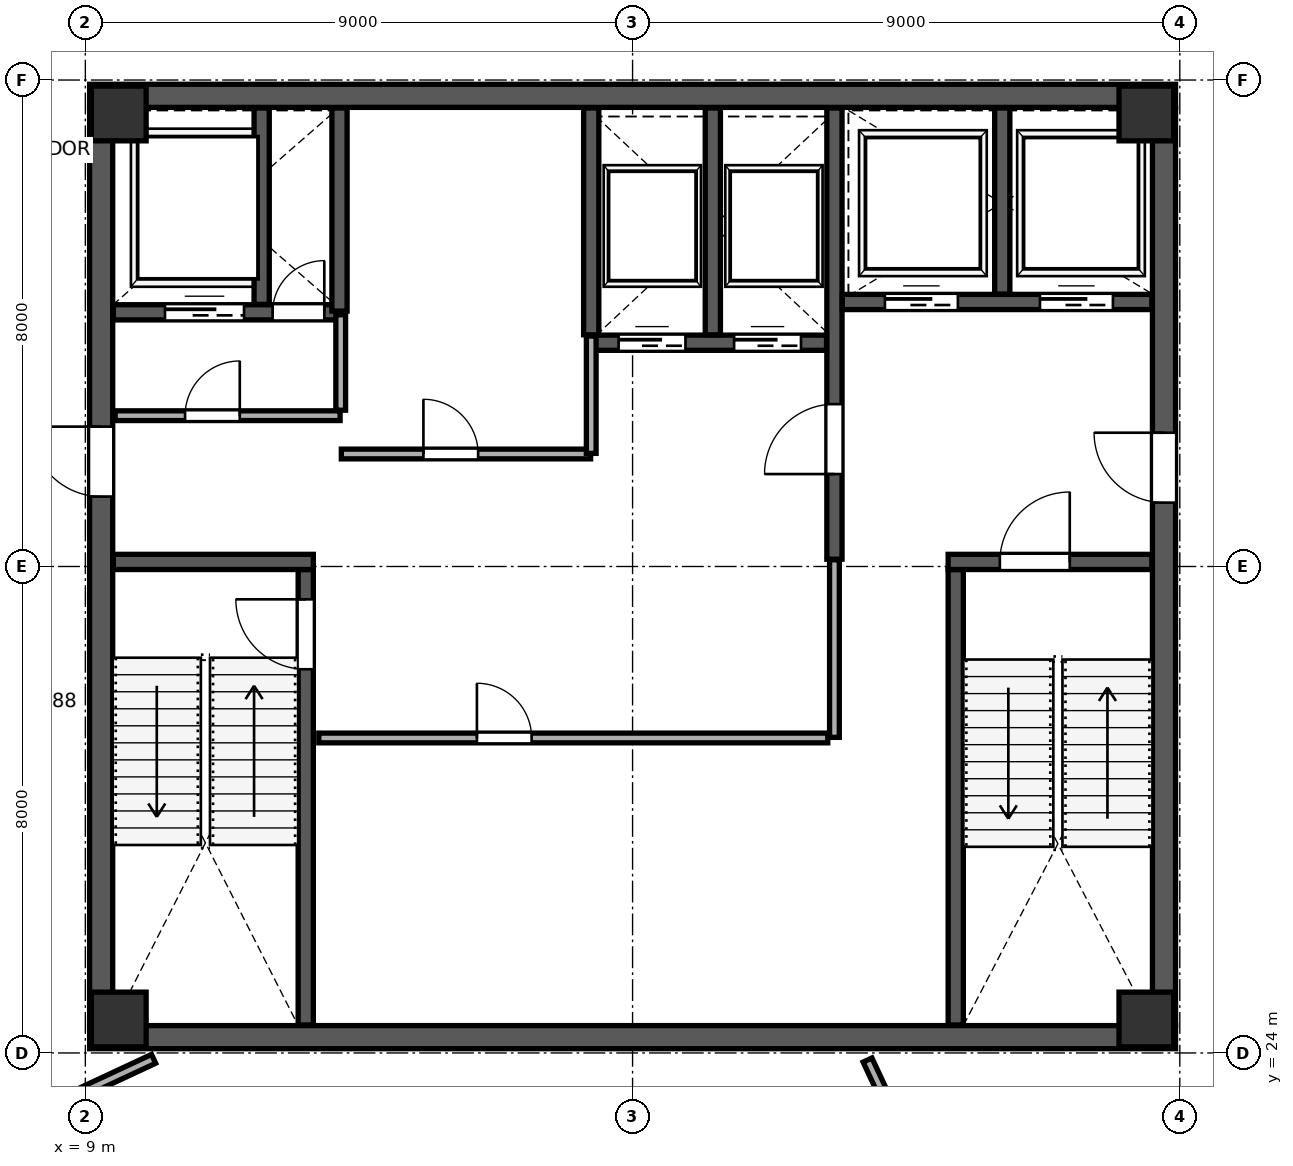
"""IFC4 building model, lengths in metres.
Left out: names, types, materials, properties, quantities, classifications, styles, units other than length and angle.
Written with IfcOpenShell. Run it as: python <this file> out.ifc"""

import sys

from ifc_helpers import new_model, si_unit, direction, frame, frame_2d, origin, origin_2d, place, context, subcontext, project, spatial, rectangle, extrude, source, transform, mapped, element, fill, save


model = new_model("IFC4")
c1 = context("Model", 3, precision=1e-05, world=origin(), true_north=direction((0.0, 1.0)))
c2 = subcontext(c1, "Body", "Model", "MODEL_VIEW")
j1 = project(units=[si_unit("LENGTHUNIT", "METRE"), si_unit("PLANEANGLEUNIT", "RADIAN")], contexts=[c1])
p1 = place(None, origin())
s1 = spatial("IfcSite", under=j1, at=p1, CompositionType="ELEMENT")
p2 = place(p1, origin())
s2 = spatial("IfcBuilding", under=s1, at=p2, CompositionType="ELEMENT")
p3 = place(p2, frame((0.0, 0.0, 340.8)))
s3 = spatial("IfcBuildingStorey", under=s2, at=p3, CompositionType="ELEMENT", Elevation=340.8)
m1 = source(origin(), c2, "Body", "SweptSolid", [
    extrude(rectangle(XDim=0.9, YDim=0.9, at=origin_2d()), origin(), (0.0, 0.0, 1.0), 4.198),
])
for number, where, z_axis, x_axis in (
    (1, (9.55, 24.55, 0.001), (0.0, 0.0, 1.0), (1.0, 0.0, 0.0)),
    (2, (26.45, 24.55, 0.001), (0.0, 0.0, 1.0), (1.0, 0.0, 0.0)),
    (3, (9.55, 39.45, 0.001), (0.0, 0.0, 1.0), (1.0, 0.0, 0.0)),
    (4, (26.45, 39.45, 0.001), (0.0, 0.0, 1.0), (1.0, 0.0, 0.0)),
):
    element("IfcColumn", number, at=place(p3, frame(where, z_axis=z_axis, x_axis=x_axis)), inside=s3, PredefinedType="COLUMN", context=c2, shape_type="MappedRepresentation", body=[
        mapped(m1, transform((0.0, 0.0, 0.0), scale=1.0)),
    ])
p4 = place(p3, frame((9.26, 24.45, 0.0), z_axis=(0.0, 0.0, 1.0), x_axis=(0.0, 1.0, 0.0)))
e5 = element("IfcWall", 5, at=p4, inside=s3, PredefinedType="SHEAR", context=c2, shape_type="SweptSolid", body=[
    extrude(rectangle(XDim=15.1, YDim=0.38, at=frame_2d((7.55, 0.0))), origin(), (0.0, 0.0, 1.0), 3.96),
])
p5 = place(p4, frame((8.7, 0.0, 0.0)))
e6 = element("IfcOpeningElement", 6, at=p5, cuts=e5, PredefinedType="OPENING", context=c2, shape_type="SweptSolid", body=[
    extrude(rectangle(XDim=1.15, YDim=2.2, at=frame_2d((0.575, 1.1))), frame((0.0, 0.2, 0.0), z_axis=(0.0, -1.0, 0.0), x_axis=(1.0, 0.0, 0.0)), (0.0, 0.0, 1.0), 0.4),
])
p6 = place(p3, frame((26.74, 24.45, 0.0), z_axis=(0.0, 0.0, 1.0), x_axis=(0.0, 1.0, 0.0)))
e7 = element("IfcWall", 7, at=p6, inside=s3, PredefinedType="SHEAR", context=c2, shape_type="SweptSolid", body=[
    extrude(rectangle(XDim=15.1, YDim=0.38, at=frame_2d((7.55, 0.0))), origin(), (0.0, 0.0, 1.0), 3.96),
])
p7 = place(p6, frame((8.6, 0.0, 0.0)))
e8 = element("IfcOpeningElement", 8, at=p7, cuts=e7, PredefinedType="OPENING", context=c2, shape_type="SweptSolid", body=[
    extrude(rectangle(XDim=1.15, YDim=2.2, at=frame_2d((0.575, 1.1))), frame((0.0, 0.2, 0.0), z_axis=(0.0, -1.0, 0.0), x_axis=(1.0, 0.0, 0.0)), (0.0, 0.0, 1.0), 0.4),
])
for number, where, z_axis, x_axis in (
    (9, (9.07, 24.26, 0.0), (0.0, 0.0, 1.0), (1.0, 0.0, 0.0)),
    (10, (9.07, 39.74, 0.0), (0.0, 0.0, 1.0), (1.0, 0.0, 0.0)),
):
    element("IfcWall", number, at=place(p3, frame(where, z_axis=z_axis, x_axis=x_axis)), inside=s3, PredefinedType="SHEAR", context=c2, shape_type="SweptSolid", body=[
        extrude(rectangle(XDim=17.86, YDim=0.38, at=frame_2d((8.93, 0.0))), origin(), (0.0, 0.0, 1.0), 3.96),
    ])
p8 = place(p3, frame((12.625, 24.46, 0.0), z_axis=(0.0, 0.0, 1.0), x_axis=(0.0, 1.0, 0.0)))
e11 = element("IfcWall", 11, at=p8, inside=s3, PredefinedType="SHEAR", context=c2, shape_type="SweptSolid", body=[
    extrude(rectangle(XDim=7.49, YDim=0.25, at=frame_2d((3.745, 0.0))), origin(), (0.0, 0.0, 1.0), 3.96),
])
p9 = place(p8, frame((5.85, 0.0, 0.0)))
e12 = element("IfcOpeningElement", 12, at=p9, cuts=e11, PredefinedType="OPENING", context=c2, shape_type="SweptSolid", body=[
    extrude(rectangle(XDim=1.15, YDim=2.2, at=frame_2d((0.575, 1.1))), frame((0.0, 0.135, 0.0), z_axis=(0.0, -1.0, 0.0), x_axis=(1.0, 0.0, 0.0)), (0.0, 0.0, 1.0), 0.27),
])
p10 = place(p3, frame((9.46, 32.075, 0.0), z_axis=(0.0, 0.0, 1.0), x_axis=(1.0, 0.0, 0.0)))
e13 = element("IfcWall", 13, at=p10, inside=s3, PredefinedType="SHEAR", context=c2, shape_type="SweptSolid", body=[
    extrude(rectangle(XDim=3.29, YDim=0.25, at=frame_2d((1.645, 0.0))), origin(), (0.0, 0.0, 1.0), 3.96),
])
p11 = place(p3, frame((23.315, 24.46, 0.0), z_axis=(0.0, 0.0, 1.0), x_axis=(0.0, 1.0, 0.0)))
e14 = element("IfcWall", 14, at=p11, inside=s3, PredefinedType="SHEAR", context=c2, shape_type="SweptSolid", body=[
    extrude(rectangle(XDim=7.49, YDim=0.25, at=frame_2d((3.745, 0.0))), origin(), (0.0, 0.0, 1.0), 3.96),
])
p12 = place(p3, frame((23.19, 32.075, 0.0), z_axis=(0.0, 0.0, 1.0), x_axis=(1.0, 0.0, 0.0)))
e15 = element("IfcWall", 15, at=p12, inside=s3, PredefinedType="SHEAR", context=c2, shape_type="SweptSolid", body=[
    extrude(rectangle(XDim=3.35, YDim=0.25, at=frame_2d((1.675, 0.0))), origin(), (0.0, 0.0, 1.0), 3.96),
])
p13 = place(p12, frame((0.85, 0.0, 0.0)))
e16 = element("IfcOpeningElement", 16, at=p13, cuts=e15, PredefinedType="OPENING", context=c2, shape_type="SweptSolid", body=[
    extrude(rectangle(XDim=1.15, YDim=2.2, at=frame_2d((0.575, 1.1))), frame((0.0, 0.135, 0.0), z_axis=(0.0, -1.0, 0.0), x_axis=(1.0, 0.0, 0.0)), (0.0, 0.0, 1.0), 0.27),
])
p14 = place(p3, frame((21.32, 32.12, 0.0), z_axis=(0.0, 0.0, 1.0), x_axis=(0.0, 1.0, 0.0)))
e17 = element("IfcWall", 17, at=p14, inside=s3, PredefinedType="SHEAR", context=c2, shape_type="SweptSolid", body=[
    extrude(rectangle(XDim=7.42, YDim=0.25, at=frame_2d((3.71, 0.0))), origin(), (0.0, 0.0, 1.0), 3.96),
])
p15 = place(p14, frame((1.4, 0.0, 0.0)))
e18 = element("IfcOpeningElement", 18, at=p15, cuts=e17, PredefinedType="OPENING", context=c2, shape_type="SweptSolid", body=[
    extrude(rectangle(XDim=1.15, YDim=2.2, at=frame_2d((0.575, 1.1))), frame((0.0, 0.135, 0.0), z_axis=(0.0, -1.0, 0.0), x_axis=(1.0, 0.0, 0.0)), (0.0, 0.0, 1.0), 0.27),
])
p16 = place(p3, frame((9.46, 36.18, 0.0), z_axis=(0.0, 0.0, 1.0), x_axis=(1.0, 0.0, 0.0)))
e19 = element("IfcWall", 19, at=p16, inside=s3, PredefinedType="SHEAR", context=c2, shape_type="SweptSolid", body=[
    extrude(rectangle(XDim=3.79, YDim=0.25, at=frame_2d((1.895, 0.0))), origin(), (0.0, 0.0, 1.0), 3.96),
])
p17 = place(p16, frame((2.62, 0.0, 0.0)))
e20 = element("IfcOpeningElement", 20, at=p17, cuts=e19, PredefinedType="OPENING", context=c2, shape_type="SweptSolid", body=[
    extrude(rectangle(XDim=0.85, YDim=2.1, at=frame_2d((0.425, 1.05))), frame((0.0, 0.135, 0.0), z_axis=(0.0, -1.0, 0.0), x_axis=(1.0, 0.0, 0.0)), (0.0, 0.0, 1.0), 0.27),
])
p18 = place(p16, frame((0.85, 0.0, 0.0)))
e21 = element("IfcOpeningElement", 21, at=p18, cuts=e19, PredefinedType="OPENING", context=c2, shape_type="SweptSolid", body=[
    extrude(rectangle(XDim=1.3, YDim=2.25, at=frame_2d((0.65, 1.125))), frame((0.0, 0.135, 0.0), z_axis=(0.0, -1.0, 0.0), x_axis=(1.0, 0.0, 0.0)), (0.0, 0.0, 1.0), 0.27),
])
p19 = place(p3, frame((11.9, 36.31, 0.0), z_axis=(0.0, 0.0, 1.0), x_axis=(0.0, 1.0, 0.0)))
e22 = element("IfcWall", 22, at=p19, inside=s3, PredefinedType="SHEAR", context=c2, shape_type="SweptSolid", body=[
    extrude(rectangle(XDim=3.23, YDim=0.25, at=frame_2d((1.615, 0.0))), origin(), (0.0, 0.0, 1.0), 3.96),
])
p20 = place(p3, frame((21.45, 36.35, 0.0), z_axis=(0.0, 0.0, 1.0), x_axis=(1.0, 0.0, 0.0)))
e23 = element("IfcWall", 23, at=p20, inside=s3, PredefinedType="SHEAR", context=c2, shape_type="SweptSolid", body=[
    extrude(rectangle(XDim=5.09, YDim=0.25, at=frame_2d((2.545, 0.0))), origin(), (0.0, 0.0, 1.0), 3.96),
])
p21 = place(p20, frame((0.7, 0.0, 0.0)))
e24 = element("IfcOpeningElement", 24, at=p21, cuts=e23, PredefinedType="OPENING", context=c2, shape_type="SweptSolid", body=[
    extrude(rectangle(XDim=1.2, YDim=2.2, at=frame_2d((0.6, 1.1))), frame((0.0, 0.135, 0.0), z_axis=(0.0, -1.0, 0.0), x_axis=(1.0, 0.0, 0.0)), (0.0, 0.0, 1.0), 0.27),
])
p22 = place(p20, frame((3.25, 0.0, 0.0)))
e25 = element("IfcOpeningElement", 25, at=p22, cuts=e23, PredefinedType="OPENING", context=c2, shape_type="SweptSolid", body=[
    extrude(rectangle(XDim=1.2, YDim=2.2, at=frame_2d((0.6, 1.1))), frame((0.0, 0.135, 0.0), z_axis=(0.0, -1.0, 0.0), x_axis=(1.0, 0.0, 0.0)), (0.0, 0.0, 1.0), 0.27),
])
p23 = place(p3, frame((24.08, 36.48, 0.0), z_axis=(0.0, 0.0, 1.0), x_axis=(0.0, 1.0, 0.0)))
e26 = element("IfcWall", 26, at=p23, inside=s3, PredefinedType="SHEAR", context=c2, shape_type="SweptSolid", body=[
    extrude(rectangle(XDim=3.06, YDim=0.25, at=frame_2d((1.53, 0.0))), origin(), (0.0, 0.0, 1.0), 3.96),
])
p24 = place(p3, frame((13.18, 36.2, 0.0), z_axis=(0.0, 0.0, 1.0), x_axis=(0.0, 1.0, 0.0)))
e27 = element("IfcWall", 27, at=p24, inside=s3, PredefinedType="SHEAR", context=c2, shape_type="SweptSolid", body=[
    extrude(rectangle(XDim=3.34, YDim=0.25, at=frame_2d((1.67, 0.0))), origin(), (0.0, 0.0, 1.0), 3.96),
])
p25 = place(p3, frame((17.32, 35.68, 0.0), z_axis=(0.0, 0.0, 1.0), x_axis=(1.0, 0.0, 0.0)))
e28 = element("IfcWall", 28, at=p25, inside=s3, PredefinedType="SHEAR", context=c2, shape_type="SweptSolid", body=[
    extrude(rectangle(XDim=3.87, YDim=0.25, at=frame_2d((1.935, 0.0))), origin(), (0.0, 0.0, 1.0), 3.96),
])
p26 = place(p25, frame((0.45, 0.0, 0.0)))
e29 = element("IfcOpeningElement", 29, at=p26, cuts=e28, PredefinedType="OPENING", context=c2, shape_type="SweptSolid", body=[
    extrude(rectangle(XDim=1.1, YDim=2.2, at=frame_2d((0.55, 1.1))), frame((0.0, 0.135, 0.0), z_axis=(0.0, -1.0, 0.0), x_axis=(1.0, 0.0, 0.0)), (0.0, 0.0, 1.0), 0.27),
])
p27 = place(p25, frame((2.35, 0.0, 0.0)))
e30 = element("IfcOpeningElement", 30, at=p27, cuts=e28, PredefinedType="OPENING", context=c2, shape_type="SweptSolid", body=[
    extrude(rectangle(XDim=1.1, YDim=2.2, at=frame_2d((0.55, 1.1))), frame((0.0, 0.135, 0.0), z_axis=(0.0, -1.0, 0.0), x_axis=(1.0, 0.0, 0.0)), (0.0, 0.0, 1.0), 0.27),
])
for number, where, z_axis, x_axis in (
    (31, (17.32, 35.81, 0.0), (0.0, 0.0, 1.0), (0.0, 1.0, 0.0)),
    (32, (19.32, 35.81, 0.0), (0.0, 0.0, 1.0), (0.0, 1.0, 0.0)),
):
    element("IfcWall", number, at=place(p3, frame(where, z_axis=z_axis, x_axis=x_axis)), inside=s3, PredefinedType="SHEAR", context=c2, shape_type="SweptSolid", body=[
        extrude(rectangle(XDim=3.73, YDim=0.25, at=frame_2d((1.865, 0.0))), origin(), (0.0, 0.0, 1.0), 3.96),
    ])
p28 = place(p3, frame((9.49, 34.48, 0.0), z_axis=(0.0, 0.0, 1.0), x_axis=(1.0, 0.0, 0.0)))
e33 = element("IfcWall", 33, at=p28, inside=s3, PredefinedType="PARTITIONING", context=c2, shape_type="SweptSolid", body=[
    extrude(rectangle(XDim=3.7, YDim=0.16, at=frame_2d((1.85, 0.0))), origin(), (0.0, 0.0, 1.0), 3.96),
])
p29 = place(p28, frame((1.15, 0.0, 0.0)))
e34 = element("IfcOpeningElement", 34, at=p29, cuts=e33, PredefinedType="OPENING", context=c2, shape_type="SweptSolid", body=[
    extrude(rectangle(XDim=0.9, YDim=2.15, at=frame_2d((0.45, 1.075))), frame((0.0, 0.09, 0.0), z_axis=(0.0, -1.0, 0.0), x_axis=(1.0, 0.0, 0.0)), (0.0, 0.0, 1.0), 0.18),
])
p30 = place(p3, frame((13.2, 34.57, 0.0), z_axis=(0.0, 0.0, 1.0), x_axis=(0.0, 1.0, 0.0)))
e35 = element("IfcWall", 35, at=p30, inside=s3, PredefinedType="PARTITIONING", context=c2, shape_type="SweptSolid", body=[
    extrude(rectangle(XDim=1.57, YDim=0.16, at=frame_2d((0.785, 0.0))), origin(), (0.0, 0.0, 1.0), 3.96),
])
p31 = place(p3, frame((13.21, 33.85, 0.0), z_axis=(0.0, 0.0, 1.0), x_axis=(1.0, 0.0, 0.0)))
e36 = element("IfcWall", 36, at=p31, inside=s3, PredefinedType="PARTITIONING", context=c2, shape_type="SweptSolid", body=[
    extrude(rectangle(XDim=4.1, YDim=0.16, at=frame_2d((2.05, 0.0))), origin(), (0.0, 0.0, 1.0), 3.96),
])
p32 = place(p31, frame((1.35, 0.0, 0.0)))
e37 = element("IfcOpeningElement", 37, at=p32, cuts=e36, PredefinedType="OPENING", context=c2, shape_type="SweptSolid", body=[
    extrude(rectangle(XDim=0.9, YDim=2.15, at=frame_2d((0.45, 1.075))), frame((0.0, 0.09, 0.0), z_axis=(0.0, -1.0, 0.0), x_axis=(1.0, 0.0, 0.0)), (0.0, 0.0, 1.0), 0.18),
])
p33 = place(p3, frame((17.32, 33.86, 0.0), z_axis=(0.0, 0.0, 1.0), x_axis=(0.0, 1.0, 0.0)))
e38 = element("IfcWall", 38, at=p33, inside=s3, PredefinedType="PARTITIONING", context=c2, shape_type="SweptSolid", body=[
    extrude(rectangle(XDim=1.93, YDim=0.16, at=frame_2d((0.965, 0.0))), origin(), (0.0, 0.0, 1.0), 3.96),
])
p34 = place(p3, frame((12.84, 29.18, 0.0), z_axis=(0.0, 0.0, 1.0), x_axis=(1.0, 0.0, 0.0)))
e39 = element("IfcWall", 39, at=p34, inside=s3, PredefinedType="PARTITIONING", context=c2, shape_type="SweptSolid", body=[
    extrude(rectangle(XDim=8.37, YDim=0.16, at=frame_2d((4.185, 0.0))), origin(), (0.0, 0.0, 1.0), 3.96),
])
p35 = place(p34, frame((2.6, 0.0, 0.0)))
e40 = element("IfcOpeningElement", 40, at=p35, cuts=e39, PredefinedType="OPENING", context=c2, shape_type="SweptSolid", body=[
    extrude(rectangle(XDim=0.9, YDim=2.15, at=frame_2d((0.45, 1.075))), frame((0.0, 0.09, 0.0), z_axis=(0.0, -1.0, 0.0), x_axis=(1.0, 0.0, 0.0)), (0.0, 0.0, 1.0), 0.18),
])
p36 = place(p3, frame((21.32, 29.19, 0.0), z_axis=(0.0, 0.0, 1.0), x_axis=(0.0, 1.0, 0.0)))
e41 = element("IfcWall", 41, at=p36, inside=s3, PredefinedType="PARTITIONING", context=c2, shape_type="SweptSolid", body=[
    extrude(rectangle(XDim=2.92, YDim=0.16, at=frame_2d((1.46, 0.0))), origin(), (0.0, 0.0, 1.0), 3.96),
])
p37 = place(p3, frame((8.268, 23.038, 0.0), z_axis=(0.0, 0.0, 1.0), x_axis=(0.906308042279, 0.422617714371, 0.0)))
e42 = element("IfcWall", 42, at=p37, inside=s3, PredefinedType="PARTITIONING", context=c2, shape_type="SweptSolid", body=[
    extrude(rectangle(XDim=2.047, YDim=0.16, at=frame_2d((1.023, 0.0))), origin(), (0.0, 0.0, 1.0), 3.96),
])
p38 = place(p3, frame((21.864, 23.884, 0.0), z_axis=(0.0, 0.0, 1.0), x_axis=(0.42259522887, -0.906318527085, 0.0)))
e43 = element("IfcWall", 43, at=p38, inside=s3, PredefinedType="PARTITIONING", context=c2, shape_type="SweptSolid", body=[
    extrude(rectangle(XDim=3.73, YDim=0.16, at=frame_2d((1.865, 0.0))), origin(), (0.0, 0.0, 1.0), 3.96),
])
p39 = place(p3, frame((24.775, 49.537, 0.0), z_axis=(0.0, 0.0, 1.0), x_axis=(0.422615543458, -0.906309054588, 0.0)))
e44 = element("IfcWall", 44, at=p39, inside=s3, PredefinedType="PARTITIONING", context=c2, shape_type="SweptSolid", body=[
    extrude(rectangle(XDim=25.75, YDim=0.1, at=frame_2d((12.875, 0.0))), origin(), (0.0, 0.0, 1.0), 3.96),
])
p40 = place(p39, frame((4.3, 0.0, 0.0)))
e45 = element("IfcOpeningElement", 45, at=p40, cuts=e44, PredefinedType="OPENING", context=c2, shape_type="SweptSolid", body=[
    extrude(rectangle(XDim=0.95, YDim=2.15, at=frame_2d((0.475, 1.075))), frame((0.0, 0.06, 0.0), z_axis=(0.0, -1.0, 0.0), x_axis=(1.0, 0.0, 0.0)), (0.0, 0.0, 1.0), 0.12),
])
p41 = place(p3, frame((2.62, 38.698, 0.0), z_axis=(0.0, 0.0, 1.0), x_axis=(0.90630352598, 0.422627399487, 0.0)))
e46 = element("IfcWall", 46, at=p41, inside=s3, PredefinedType="PARTITIONING", context=c2, shape_type="SweptSolid", body=[
    extrude(rectangle(XDim=17.04, YDim=0.1, at=frame_2d((8.52, 0.0))), origin(), (0.0, 0.0, 1.0), 3.96),
])
p42 = place(p3, frame((24.89, 21.135, 0.0), z_axis=(0.0, 0.0, 1.0), x_axis=(0.906308982529, 0.42261569799, 0.0)))
e47 = element("IfcWall", 47, at=p42, inside=s3, PredefinedType="PARTITIONING", context=c2, shape_type="SweptSolid", body=[
    extrude(rectangle(XDim=17.54, YDim=0.16, at=frame_2d((8.77, 0.0))), origin(), (0.0, 0.0, 1.0), 3.96),
])
m2 = source(origin(), c2, "Body", "SweptSolid", [
    extrude(rectangle(XDim=1.15, YDim=2.2, at=frame_2d((0.575, 1.1))), frame((0.0, 0.025, 0.0), z_axis=(0.0, -1.0, 0.0), x_axis=(1.0, 0.0, 0.0)), (0.0, 0.0, 1.0), 0.05),
])
p43 = place(p9, origin())
e48 = element("IfcDoor", 48, at=p43, inside=s3, OperationType="SINGLE_SWING_RIGHT", PredefinedType="DOOR", context=c2, shape_type="MappedRepresentation", body=[
    mapped(m2, transform((0.0, 0.0, 0.0), scale=1.0)),
])
fill(e12, e48)
m3 = source(origin(), c2, "Body", "SweptSolid", [
    extrude(rectangle(XDim=1.15, YDim=2.2, at=frame_2d((0.575, 1.1))), frame((0.0, 0.025, 0.0), z_axis=(0.0, -1.0, 0.0), x_axis=(1.0, 0.0, 0.0)), (0.0, 0.0, 1.0), 0.05),
])
p44 = place(p15, origin())
e49 = element("IfcDoor", 49, at=p44, inside=s3, OperationType="SINGLE_SWING_LEFT", PredefinedType="DOOR", context=c2, shape_type="MappedRepresentation", body=[
    mapped(m3, transform((0.0, 0.0, 0.0), scale=1.0)),
])
fill(e18, e49)
p45 = place(p13, origin())
e50 = element("IfcDoor", 50, at=p45, inside=s3, OperationType="SINGLE_SWING_RIGHT", PredefinedType="DOOR", context=c2, shape_type="MappedRepresentation", body=[
    mapped(m2, transform((0.0, 0.0, 0.0), scale=1.0)),
])
fill(e16, e50)
p46 = place(p7, origin())
e51 = element("IfcDoor", 51, at=p46, inside=s3, OperationType="SINGLE_SWING_RIGHT", PredefinedType="DOOR", context=c2, shape_type="MappedRepresentation", body=[
    mapped(m3, transform((0.0, 0.0, 0.0), scale=1.0)),
])
fill(e8, e51)
p47 = place(p5, origin())
e52 = element("IfcDoor", 52, at=p47, inside=s3, OperationType="SINGLE_SWING_RIGHT", PredefinedType="DOOR", context=c2, shape_type="MappedRepresentation", body=[
    mapped(m3, transform((0.0, 0.0, 0.0), scale=1.0)),
])
fill(e6, e52)
m4 = source(origin(), c2, "Body", "SweptSolid", [
    extrude(rectangle(XDim=0.85, YDim=2.1, at=frame_2d((0.425, 1.05))), frame((0.0, 0.025, 0.0), z_axis=(0.0, -1.0, 0.0), x_axis=(1.0, 0.0, 0.0)), (0.0, 0.0, 1.0), 0.05),
])
p48 = place(p17, origin())
e53 = element("IfcDoor", 53, at=p48, inside=s3, OperationType="SINGLE_SWING_RIGHT", PredefinedType="DOOR", context=c2, shape_type="MappedRepresentation", body=[
    mapped(m4, transform((0.0, 0.0, 0.0), scale=1.0)),
])
fill(e20, e53)
m5 = source(origin(), c2, "Body", "SweptSolid", [
    extrude(rectangle(XDim=1.1, YDim=2.2, at=frame_2d((0.55, 1.1))), frame((0.0, 0.025, 0.0), z_axis=(0.0, -1.0, 0.0), x_axis=(1.0, 0.0, 0.0)), (0.0, 0.0, 1.0), 0.05),
])
p49 = place(p26, origin())
e54 = element("IfcDoor", 54, at=p49, inside=s3, OperationType="SLIDING_TO_LEFT", PredefinedType="DOOR", context=c2, shape_type="MappedRepresentation", body=[
    mapped(m5, transform((0.0, 0.0, 0.0), scale=1.0)),
])
fill(e29, e54)
p50 = place(p27, origin())
e55 = element("IfcDoor", 55, at=p50, inside=s3, OperationType="SLIDING_TO_RIGHT", PredefinedType="DOOR", context=c2, shape_type="MappedRepresentation", body=[
    mapped(m5, transform((0.0, 0.0, 0.0), scale=1.0)),
])
fill(e30, e55)
m6 = source(origin(), c2, "Body", "SweptSolid", [
    extrude(rectangle(XDim=1.2, YDim=2.2, at=frame_2d((0.6, 1.1))), frame((0.0, 0.025, 0.0), z_axis=(0.0, -1.0, 0.0), x_axis=(1.0, 0.0, 0.0)), (0.0, 0.0, 1.0), 0.05),
])
p51 = place(p21, origin())
e56 = element("IfcDoor", 56, at=p51, inside=s3, OperationType="SLIDING_TO_LEFT", PredefinedType="DOOR", context=c2, shape_type="MappedRepresentation", body=[
    mapped(m6, transform((0.0, 0.0, 0.0), scale=1.0)),
])
fill(e24, e56)
p52 = place(p22, origin())
e57 = element("IfcDoor", 57, at=p52, inside=s3, OperationType="SLIDING_TO_RIGHT", PredefinedType="DOOR", context=c2, shape_type="MappedRepresentation", body=[
    mapped(m6, transform((0.0, 0.0, 0.0), scale=1.0)),
])
fill(e25, e57)
m7 = source(origin(), c2, "Body", "SweptSolid", [
    extrude(rectangle(XDim=1.3, YDim=2.25, at=frame_2d((0.65, 1.125))), frame((0.0, 0.025, 0.0), z_axis=(0.0, -1.0, 0.0), x_axis=(1.0, 0.0, 0.0)), (0.0, 0.0, 1.0), 0.05),
])
p53 = place(p18, origin())
e58 = element("IfcDoor", 58, at=p53, inside=s3, OperationType="SLIDING_TO_LEFT", PredefinedType="DOOR", context=c2, shape_type="MappedRepresentation", body=[
    mapped(m7, transform((0.0, 0.0, 0.0), scale=1.0)),
])
fill(e21, e58)
m8 = source(origin(), c2, "Body", "SweptSolid", [
    extrude(rectangle(XDim=0.9, YDim=2.15, at=frame_2d((0.45, 1.075))), frame((0.0, 0.025, 0.0), z_axis=(0.0, -1.0, 0.0), x_axis=(1.0, 0.0, 0.0)), (0.0, 0.0, 1.0), 0.05),
])
p54 = place(p29, origin())
e59 = element("IfcDoor", 59, at=p54, inside=s3, OperationType="SINGLE_SWING_RIGHT", PredefinedType="DOOR", context=c2, shape_type="MappedRepresentation", body=[
    mapped(m8, transform((0.0, 0.0, 0.0), scale=1.0)),
])
fill(e34, e59)
p55 = place(p32, origin())
e60 = element("IfcDoor", 60, at=p55, inside=s3, OperationType="SINGLE_SWING_LEFT", PredefinedType="DOOR", context=c2, shape_type="MappedRepresentation", body=[
    mapped(m8, transform((0.0, 0.0, 0.0), scale=1.0)),
])
fill(e37, e60)
p56 = place(p35, origin())
e61 = element("IfcDoor", 61, at=p56, inside=s3, OperationType="SINGLE_SWING_LEFT", PredefinedType="DOOR", context=c2, shape_type="MappedRepresentation", body=[
    mapped(m8, transform((0.0, 0.0, 0.0), scale=1.0)),
])
fill(e40, e61)
save(model, sys.argv[1])
